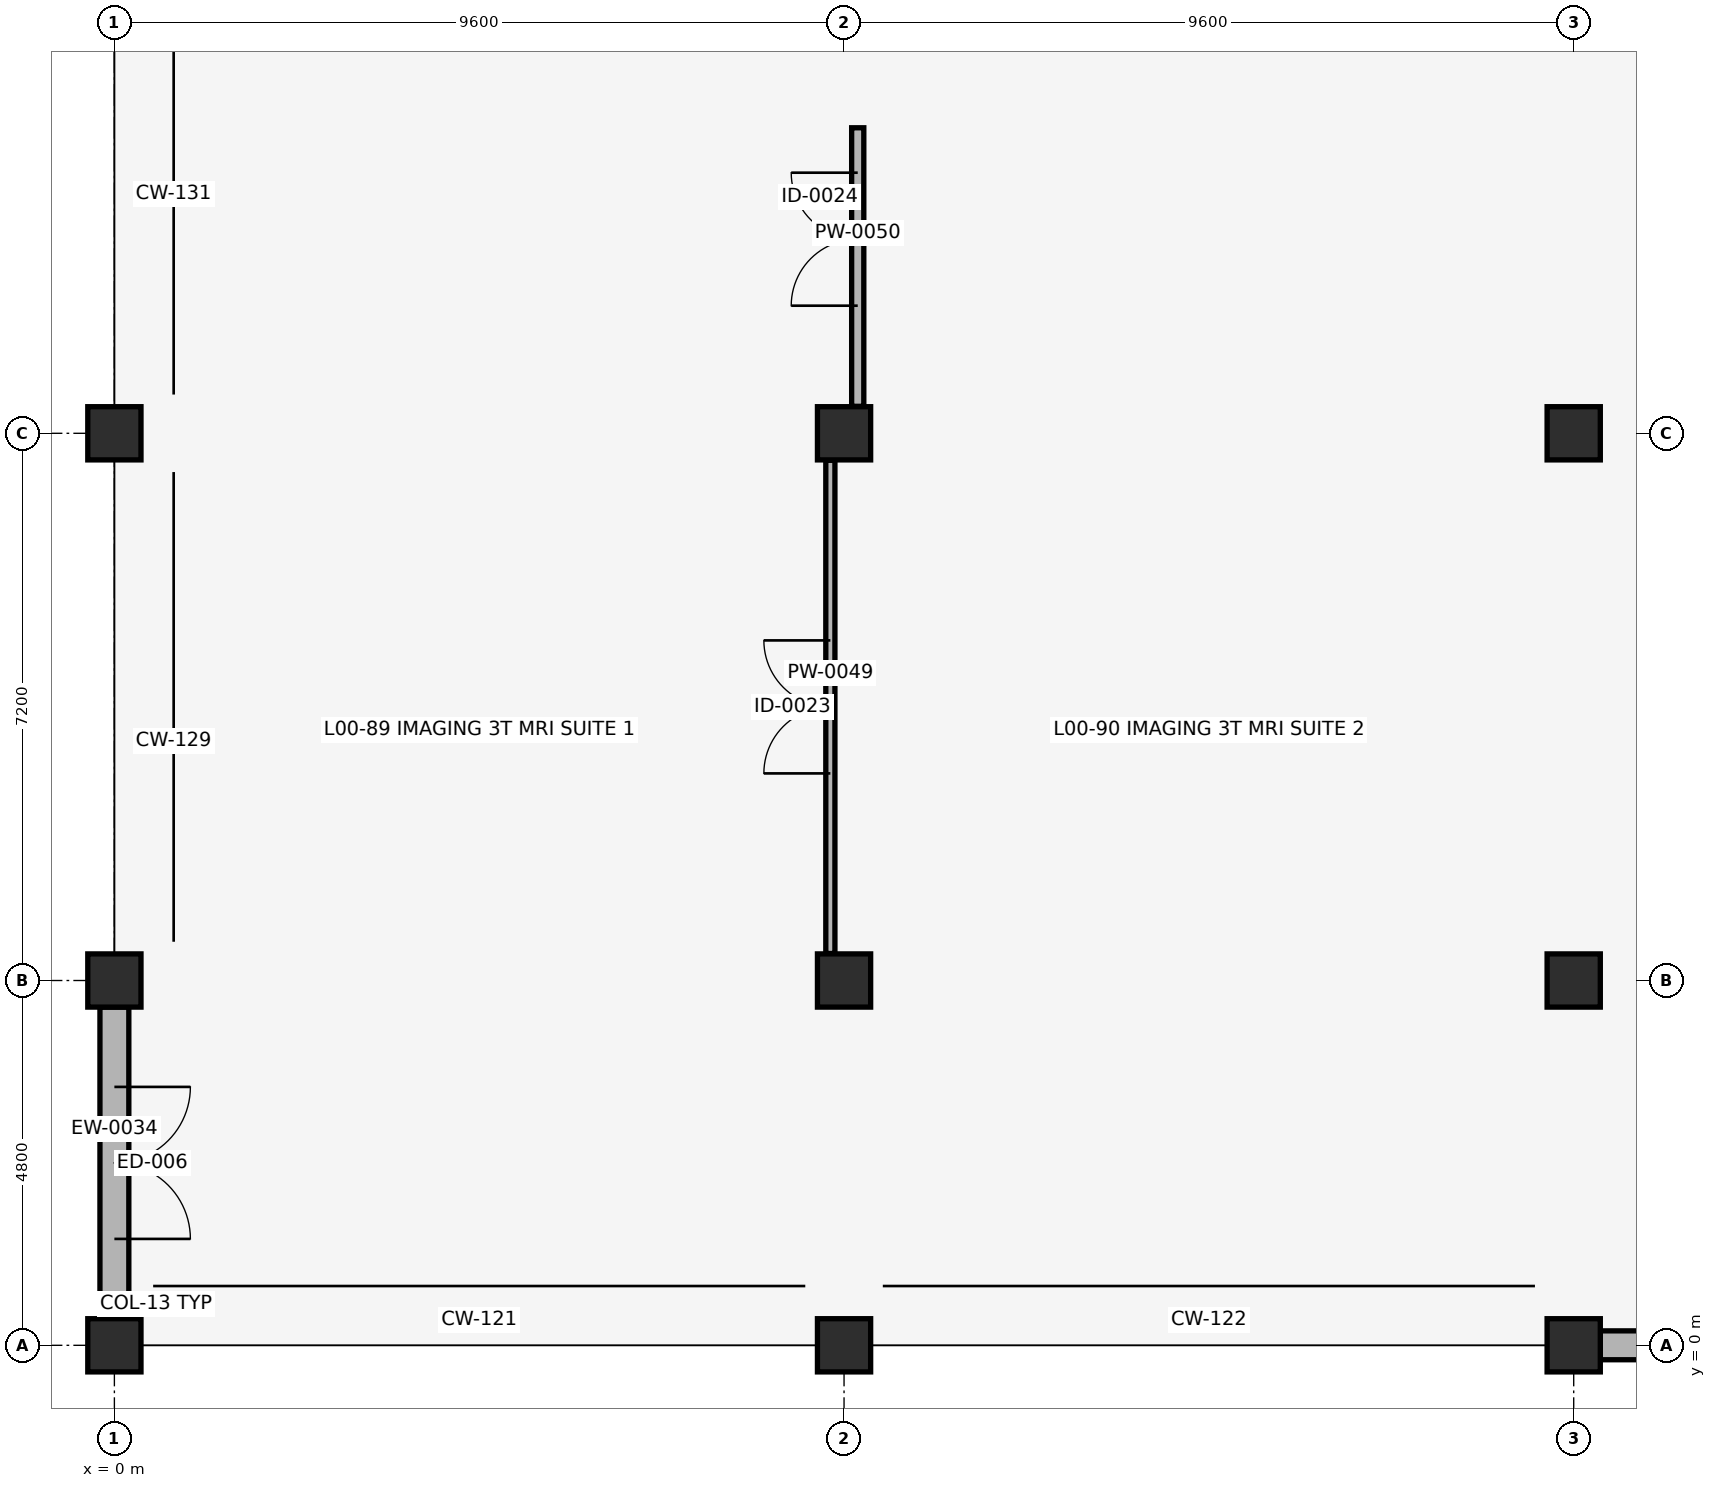
"""IFC4 building model, lengths in metres.
Left out: names, types, materials, properties, quantities, classifications, styles, units other than length and angle.
Written with IfcOpenShell. Run it as: python <this file> out.ifc"""

import sys

from ifc_helpers import new_model, si_unit, direction, frame, frame_2d, origin, origin_2d, place, context, subcontext, project, spatial, rectangle, circle, extrude, element, fill, save


model = new_model("IFC4")
c1 = context("Model", 3, precision=1e-05, world=origin(), true_north=direction((0.0, 1.0)))
c2 = subcontext(c1, "Body", "Model", "MODEL_VIEW")
j1 = project(units=[si_unit("LENGTHUNIT", "METRE"), si_unit("PLANEANGLEUNIT", "RADIAN")], contexts=[c1])
p1 = place(None, origin())
s1 = spatial("IfcSite", under=j1, at=p1, CompositionType="ELEMENT")
p2 = place(p1, origin())
s2 = spatial("IfcBuilding", under=s1, at=p2, CompositionType="ELEMENT")
p3 = place(p2, origin())
s3 = spatial("IfcBuildingStorey", under=s2, at=p3, CompositionType="ELEMENT", Elevation=0.0)
for number, where, z_axis, x_axis in (
    (1, (0.0, 0.0, 0.0), (0.0, 0.0, 1.0), (1.0, 0.0, 0.0)),
    (2, (0.0, 4.8, 0.0), (0.0, 0.0, 1.0), (1.0, 0.0, 0.0)),
    (3, (0.0, 12.0, 0.0), (0.0, 0.0, 1.0), (1.0, 0.0, 0.0)),
    (4, (9.6, 0.0, 0.0), (0.0, 0.0, 1.0), (1.0, 0.0, 0.0)),
    (5, (9.6, 4.8, 0.0), (0.0, 0.0, 1.0), (1.0, 0.0, 0.0)),
    (6, (9.6, 12.0, 0.0), (0.0, 0.0, 1.0), (1.0, 0.0, 0.0)),
    (7, (19.2, 0.0, 0.0), (0.0, 0.0, 1.0), (1.0, 0.0, 0.0)),
    (8, (19.2, 4.8, 0.0), (0.0, 0.0, 1.0), (1.0, 0.0, 0.0)),
    (9, (19.2, 12.0, 0.0), (0.0, 0.0, 1.0), (1.0, 0.0, 0.0)),
):
    element("IfcColumn", number, at=place(p3, frame(where, z_axis=z_axis, x_axis=x_axis)), inside=s3, PredefinedType="COLUMN", context=c2, shape_type="SweptSolid", body=[
        extrude(circle(Radius=0.35, at=origin_2d()), origin(), (0.0, 0.0, 1.0), 4.42),
    ])
p4 = place(p3, frame((19.55, 0.0, 0.0), z_axis=(0.0, 0.0, 1.0), x_axis=(1.0, 0.0, 0.0)))
e10 = element("IfcWall", 10, at=p4, inside=s3, PredefinedType="SOLIDWALL", context=c2, shape_type="SweptSolid", body=[
    extrude(rectangle(XDim=8.9, YDim=0.38, at=frame_2d((4.45, 0.0))), origin(), (0.0, 0.0, 1.0), 3.31),
])
p5 = place(p4, frame((3.4, 0.0, 0.0)))
e11 = element("IfcOpeningElement", 11, at=p5, cuts=e10, PredefinedType="OPENING", context=c2, shape_type="SweptSolid", body=[
    extrude(rectangle(XDim=2.1, YDim=2.3, at=frame_2d((1.05, 1.15))), frame((0.0, 0.2, 0.0), z_axis=(0.0, -1.0, 0.0), x_axis=(1.0, 0.0, 0.0)), (0.0, 0.0, 1.0), 0.4),
])
p6 = place(p3, frame((0.0, 4.45, 0.0), z_axis=(0.0, 0.0, 1.0), x_axis=(0.0, -1.0, 0.0)))
e12 = element("IfcWall", 12, at=p6, inside=s3, PredefinedType="SOLIDWALL", context=c2, shape_type="SweptSolid", body=[
    extrude(rectangle(XDim=4.1, YDim=0.38, at=frame_2d((2.05, 0.0))), origin(), (0.0, 0.0, 1.0), 3.31),
])
p7 = place(p6, frame((1.05, 0.0, 0.0)))
e13 = element("IfcOpeningElement", 13, at=p7, cuts=e12, PredefinedType="OPENING", context=c2, shape_type="SweptSolid", body=[
    extrude(rectangle(XDim=2.0, YDim=2.3, at=frame_2d((1.0, 1.15))), frame((0.0, 0.2, 0.0), z_axis=(0.0, -1.0, 0.0), x_axis=(1.0, 0.0, 0.0)), (0.0, 0.0, 1.0), 0.4),
])
p8 = place(p3, frame((9.42, 5.155, 0.0), z_axis=(0.0, 0.0, 1.0), x_axis=(0.0, 1.0, 0.0)))
e14 = element("IfcWall", 14, at=p8, inside=s3, PredefinedType="PARTITIONING", context=c2, shape_type="SweptSolid", body=[
    extrude(rectangle(XDim=6.49, YDim=0.12, at=frame_2d((3.245, 0.0))), origin(), (0.0, 0.0, 1.0), 3.31),
])
p9 = place(p8, frame((2.37, 0.0, 0.0)))
e15 = element("IfcOpeningElement", 15, at=p9, cuts=e14, PredefinedType="OPENING", context=c2, shape_type="SweptSolid", body=[
    extrude(rectangle(XDim=1.75, YDim=2.15, at=frame_2d((0.875, 1.075))), frame((0.0, 0.07, 0.0), z_axis=(0.0, -1.0, 0.0), x_axis=(1.0, 0.0, 0.0)), (0.0, 0.0, 1.0), 0.14),
])
p10 = place(p3, frame((9.78, 12.355, 0.0), z_axis=(0.0, 0.0, 1.0), x_axis=(0.0, 1.0, 0.0)))
e16 = element("IfcWall", 16, at=p10, inside=s3, PredefinedType="PARTITIONING", context=c2, shape_type="SweptSolid", body=[
    extrude(rectangle(XDim=3.665, YDim=0.16, at=frame_2d((1.833, 0.0))), origin(), (0.0, 0.0, 1.0), 3.31),
])
p11 = place(p10, frame((1.324, 0.0, 0.0)))
e17 = element("IfcOpeningElement", 17, at=p11, cuts=e16, PredefinedType="OPENING", context=c2, shape_type="SweptSolid", body=[
    extrude(rectangle(XDim=1.75, YDim=2.15, at=frame_2d((0.875, 1.075))), frame((0.0, 0.09, 0.0), z_axis=(0.0, -1.0, 0.0), x_axis=(1.0, 0.0, 0.0)), (0.0, 0.0, 1.0), 0.18),
])
p12 = place(p7, origin())
e18 = element("IfcDoor", 18, at=p12, inside=s3, OperationType="DOUBLE_DOOR_SINGLE_SWING", PredefinedType="DOOR", context=c2, shape_type="SweptSolid", body=[
    extrude(rectangle(XDim=2.0, YDim=2.3, at=frame_2d((1.0, 1.15))), frame((0.0, 0.025, 0.0), z_axis=(0.0, -1.0, 0.0), x_axis=(1.0, 0.0, 0.0)), (0.0, 0.0, 1.0), 0.05),
])
fill(e13, e18)
p13 = place(p9, origin())
e19 = element("IfcDoor", 19, at=p13, inside=s3, OperationType="DOUBLE_DOOR_SINGLE_SWING", PredefinedType="DOOR", context=c2, shape_type="SweptSolid", body=[
    extrude(rectangle(XDim=1.75, YDim=2.15, at=frame_2d((0.875, 1.075))), frame((0.0, 0.025, 0.0), z_axis=(0.0, -1.0, 0.0), x_axis=(1.0, 0.0, 0.0)), (0.0, 0.0, 1.0), 0.05),
])
fill(e15, e19)
p14 = place(p11, origin())
e20 = element("IfcDoor", 20, at=p14, inside=s3, OperationType="DOUBLE_DOOR_SINGLE_SWING", PredefinedType="DOOR", context=c2, shape_type="SweptSolid", body=[
    extrude(rectangle(XDim=1.75, YDim=2.15, at=frame_2d((0.875, 1.075))), frame((0.0, 0.025, 0.0), z_axis=(0.0, -1.0, 0.0), x_axis=(1.0, 0.0, 0.0)), (0.0, 0.0, 1.0), 0.05),
])
fill(e17, e20)
save(model, sys.argv[1])
